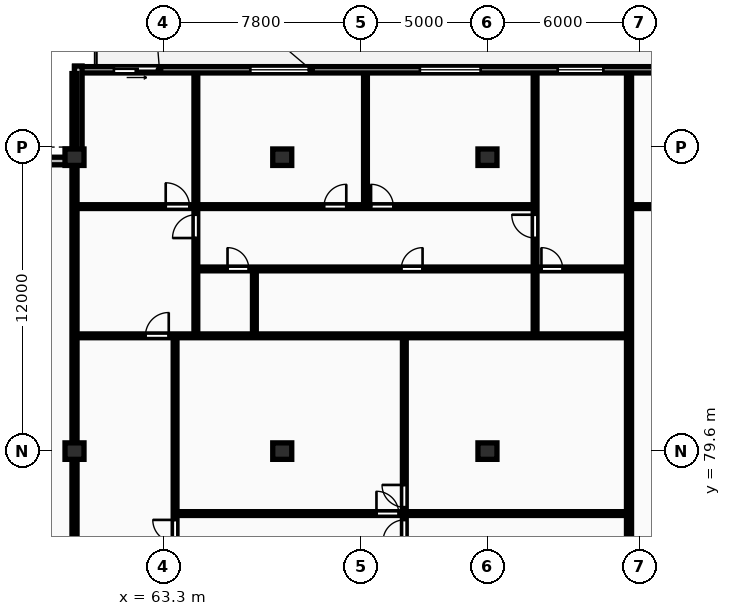
"""IFC4 building model, lengths in metres.
Left out: names, types, materials, properties, quantities, classifications, styles, units other than length and angle.
Written with IfcOpenShell. Run it as: python <this file> out.ifc"""

import sys

from ifc_helpers import new_model, si_unit, direction, frame, frame_2d, origin, origin_2d, place, context, subcontext, project, spatial, rectangle, extrude, element, fill, save


model = new_model("IFC4")
c1 = context("Model", 3, precision=1e-05, world=origin(), true_north=direction((0.0, 1.0)))
c2 = subcontext(c1, "Body", "Model", "MODEL_VIEW")
j1 = project(units=[si_unit("LENGTHUNIT", "METRE"), si_unit("PLANEANGLEUNIT", "RADIAN")], contexts=[c1])
p1 = place(None, origin())
s1 = spatial("IfcSite", under=j1, at=p1, CompositionType="ELEMENT")
p2 = place(p1, origin())
s2 = spatial("IfcBuilding", under=s1, at=p2, CompositionType="ELEMENT")
p3 = place(p2, frame((0.0, 0.0, 228.65)))
s3 = spatial("IfcBuildingStorey", under=s2, at=p3, CompositionType="ELEMENT", Elevation=228.65)
for number, where, z_axis, x_axis in (
    (1, (59.8, 79.6, 0.0), (0.0, 0.0, 1.0), (1.0, 0.0, 0.0)),
    (2, (59.8, 91.2, 0.0), (0.0, 0.0, 1.0), (1.0, 0.0, 0.0)),
    (3, (68.0, 79.6, 0.0), (0.0, 0.0, 1.0), (1.0, 0.0, 0.0)),
    (4, (68.0, 91.2, 0.0), (0.0, 0.0, 1.0), (1.0, 0.0, 0.0)),
    (5, (76.1, 79.6, 0.0), (0.0, 0.0, 1.0), (1.0, 0.0, 0.0)),
    (6, (76.1, 91.2, 0.0), (0.0, 0.0, 1.0), (1.0, 0.0, 0.0)),
):
    element("IfcColumn", number, at=place(p3, frame(where, z_axis=z_axis, x_axis=x_axis)), inside=s3, PredefinedType="COLUMN", context=c2, shape_type="SweptSolid", body=[
        extrude(rectangle(XDim=0.75, YDim=0.65, at=origin_2d()), origin(), (0.0, 0.0, 1.0), 3.45),
    ])
p4 = place(p3, frame((128.4, 94.65, 0.0), z_axis=(0.0, 0.0, 1.0), x_axis=(-1.0, 0.0, 0.0)))
e7 = element("IfcWall", 7, at=p4, inside=s3, PredefinedType="STANDARD", context=c2, shape_type="SweptSolid", body=[
    extrude(rectangle(XDim=68.6, YDim=0.25, at=frame_2d((34.3, 0.0))), origin(), (0.0, 0.0, 1.0), 3.17),
])
p5 = place(p4, frame((59.262, 0.0, 0.85)))
e8 = element("IfcOpeningElement", 8, at=p5, cuts=e7, PredefinedType="OPENING", context=c2, shape_type="SweptSolid", body=[
    extrude(rectangle(XDim=2.4, YDim=1.9, at=frame_2d((1.2, 0.95))), frame((0.0, 0.135, 0.0), z_axis=(0.0, -1.0, 0.0), x_axis=(1.0, 0.0, 0.0)), (0.0, 0.0, 1.0), 0.27),
])
p6 = place(p4, frame((52.567, 0.0, 0.85)))
e9 = element("IfcOpeningElement", 9, at=p6, cuts=e7, PredefinedType="OPENING", context=c2, shape_type="SweptSolid", body=[
    extrude(rectangle(XDim=2.4, YDim=1.9, at=frame_2d((1.2, 0.95))), frame((0.0, 0.135, 0.0), z_axis=(0.0, -1.0, 0.0), x_axis=(1.0, 0.0, 0.0)), (0.0, 0.0, 1.0), 0.27),
])
p7 = place(p4, frame((65.245, 0.0, 0.0)))
e10 = element("IfcOpeningElement", 10, at=p7, cuts=e7, PredefinedType="OPENING", context=c2, shape_type="SweptSolid", body=[
    extrude(rectangle(XDim=1.8, YDim=2.2, at=frame_2d((0.9, 1.1))), frame((0.0, 0.135, 0.0), z_axis=(0.0, -1.0, 0.0), x_axis=(1.0, 0.0, 0.0)), (0.0, 0.0, 1.0), 0.27),
])
p8 = place(p4, frame((47.726, 0.0, 0.85)))
e11 = element("IfcOpeningElement", 11, at=p8, cuts=e7, PredefinedType="OPENING", context=c2, shape_type="SweptSolid", body=[
    extrude(rectangle(XDim=1.8, YDim=1.8, at=frame_2d((0.9, 0.9))), frame((0.0, 0.135, 0.0), z_axis=(0.0, -1.0, 0.0), x_axis=(1.0, 0.0, 0.0)), (0.0, 0.0, 1.0), 0.27),
])
p9 = place(p4, frame((41.938, 0.0, 0.0)))
e12 = element("IfcOpeningElement", 12, at=p9, cuts=e7, PredefinedType="OPENING", context=c2, shape_type="SweptSolid", body=[
    extrude(rectangle(XDim=1.8, YDim=2.2, at=frame_2d((0.9, 1.1))), frame((0.0, 0.135, 0.0), z_axis=(0.0, -1.0, 0.0), x_axis=(1.0, 0.0, 0.0)), (0.0, 0.0, 1.0), 0.27),
])
p10 = place(p4, frame((32.824, 0.0, 0.85)))
e13 = element("IfcOpeningElement", 13, at=p10, cuts=e7, PredefinedType="OPENING", context=c2, shape_type="SweptSolid", body=[
    extrude(rectangle(XDim=2.4, YDim=1.9, at=frame_2d((1.2, 0.95))), frame((0.0, 0.135, 0.0), z_axis=(0.0, -1.0, 0.0), x_axis=(1.0, 0.0, 0.0)), (0.0, 0.0, 1.0), 0.27),
])
p11 = place(p4, frame((20.245, 0.0, 0.85)))
e14 = element("IfcOpeningElement", 14, at=p11, cuts=e7, PredefinedType="OPENING", context=c2, shape_type="SweptSolid", body=[
    extrude(rectangle(XDim=2.4, YDim=1.9, at=frame_2d((1.2, 0.95))), frame((0.0, 0.135, 0.0), z_axis=(0.0, -1.0, 0.0), x_axis=(1.0, 0.0, 0.0)), (0.0, 0.0, 1.0), 0.27),
])
p12 = place(p4, frame((15.645, 0.0, 0.85)))
e15 = element("IfcOpeningElement", 15, at=p12, cuts=e7, PredefinedType="OPENING", context=c2, shape_type="SweptSolid", body=[
    extrude(rectangle(XDim=2.4, YDim=1.9, at=frame_2d((1.2, 0.95))), frame((0.0, 0.135, 0.0), z_axis=(0.0, -1.0, 0.0), x_axis=(1.0, 0.0, 0.0)), (0.0, 0.0, 1.0), 0.27),
])
p13 = place(p4, frame((25.272, 0.0, 0.0)))
e16 = element("IfcOpeningElement", 16, at=p13, cuts=e7, PredefinedType="OPENING", context=c2, shape_type="SweptSolid", body=[
    extrude(rectangle(XDim=1.8, YDim=2.2, at=frame_2d((0.9, 1.1))), frame((0.0, 0.135, 0.0), z_axis=(0.0, -1.0, 0.0), x_axis=(1.0, 0.0, 0.0)), (0.0, 0.0, 1.0), 0.27),
])
p14 = place(p4, frame((12.11, 0.0, 0.85)))
e17 = element("IfcOpeningElement", 17, at=p14, cuts=e7, PredefinedType="OPENING", context=c2, shape_type="SweptSolid", body=[
    extrude(rectangle(XDim=1.8, YDim=1.8, at=frame_2d((0.9, 0.9))), frame((0.0, 0.135, 0.0), z_axis=(0.0, -1.0, 0.0), x_axis=(1.0, 0.0, 0.0)), (0.0, 0.0, 1.0), 0.27),
])
p15 = place(p4, frame((6.515, 0.0, 0.0)))
e18 = element("IfcOpeningElement", 18, at=p15, cuts=e7, PredefinedType="OPENING", context=c2, shape_type="SweptSolid", body=[
    extrude(rectangle(XDim=1.8, YDim=2.2, at=frame_2d((0.9, 1.1))), frame((0.0, 0.135, 0.0), z_axis=(0.0, -1.0, 0.0), x_axis=(1.0, 0.0, 0.0)), (0.0, 0.0, 1.0), 0.27),
])
p16 = place(p4, frame((0.87, 0.0, 0.85)))
e19 = element("IfcOpeningElement", 19, at=p16, cuts=e7, PredefinedType="OPENING", context=c2, shape_type="SweptSolid", body=[
    extrude(rectangle(XDim=1.8, YDim=1.8, at=frame_2d((0.9, 0.9))), frame((0.0, 0.135, 0.0), z_axis=(0.0, -1.0, 0.0), x_axis=(1.0, 0.0, 0.0)), (0.0, 0.0, 1.0), 0.27),
])
for number, where, z_axis, x_axis in (
    (20, (59.95, 94.8, 0.0), (0.0, 0.0, 1.0), (0.0, -1.0, 0.0)),
    (21, (59.8, 91.05, 0.0), (0.0, 0.0, 1.0), (-1.0, 0.0, 0.0)),
):
    element("IfcWall", number, at=place(p3, frame(where, z_axis=z_axis, x_axis=x_axis)), inside=s3, PredefinedType="STANDARD", context=c2, shape_type="SweptSolid", body=[
        extrude(rectangle(XDim=3.6, YDim=0.3, at=frame_2d((1.8, 0.0))), origin(), (0.0, 0.0, 1.0), 3.17),
    ])
p17 = place(p3, frame((59.8, 70.18, 0.0), z_axis=(0.0, 0.0, 1.0), x_axis=(0.0, 1.0, 0.0)))
e22 = element("IfcWall", 22, at=p17, inside=s3, PredefinedType="PARTITIONING", context=c2, shape_type="SweptSolid", body=[
    extrude(rectangle(XDim=24.32, YDim=0.2, at=frame_2d((12.16, 0.0))), origin(), (0.0, 0.0, 1.0), 2.477),
])
p18 = place(p3, frame((81.687, 70.18, 0.0), z_axis=(0.0, 0.0, 1.0), x_axis=(0.0, 1.0, 0.0)))
e23 = element("IfcWall", 23, at=p18, inside=s3, PredefinedType="PARTITIONING", context=c2, shape_type="SweptSolid", body=[
    extrude(rectangle(XDim=24.32, YDim=0.2, at=frame_2d((12.16, 0.0))), origin(), (0.0, 0.0, 1.0), 3.17),
])
p19 = place(p3, frame((72.819, 70.16, 0.0), z_axis=(0.0, 0.0, 1.0), x_axis=(0.0, 1.0, 0.0)))
e24 = element("IfcWall", 24, at=p19, inside=s3, PredefinedType="PARTITIONING", context=c2, shape_type="SweptSolid", body=[
    extrude(rectangle(XDim=13.95, YDim=0.15, at=frame_2d((6.975, 0.0))), origin(), (0.0, 0.0, 1.0), 3.17),
])
p20 = place(p19, frame((5.885, 0.0, 0.0)))
e25 = element("IfcOpeningElement", 25, at=p20, cuts=e24, PredefinedType="OPENING", context=c2, shape_type="SweptSolid", body=[
    extrude(rectangle(XDim=0.84, YDim=2.04, at=frame_2d((0.42, 1.02))), frame((0.0, 0.085, 0.0), z_axis=(0.0, -1.0, 0.0), x_axis=(1.0, 0.0, 0.0)), (0.0, 0.0, 1.0), 0.17),
])
p21 = place(p19, frame((7.225, 0.0, 0.0)))
e26 = element("IfcOpeningElement", 26, at=p21, cuts=e24, PredefinedType="OPENING", context=c2, shape_type="SweptSolid", body=[
    extrude(rectangle(XDim=0.88, YDim=2.06, at=frame_2d((0.44, 1.03))), frame((0.0, 0.085, 0.0), z_axis=(0.0, -1.0, 0.0), x_axis=(1.0, 0.0, 0.0)), (0.0, 0.0, 1.0), 0.17),
])
p22 = place(p3, frame((63.83, 77.135, 0.0), z_axis=(0.0, 0.0, 1.0), x_axis=(1.0, 0.0, 0.0)))
e27 = element("IfcWall", 27, at=p22, inside=s3, PredefinedType="PARTITIONING", context=c2, shape_type="SweptSolid", body=[
    extrude(rectangle(XDim=17.777, YDim=0.15, at=frame_2d((8.889, 0.0))), origin(), (0.0, 0.0, 1.0), 3.17),
])
p23 = place(p22, frame((7.889, 0.0, 0.0)))
e28 = element("IfcOpeningElement", 28, at=p23, cuts=e27, PredefinedType="OPENING", context=c2, shape_type="SweptSolid", body=[
    extrude(rectangle(XDim=0.88, YDim=2.06, at=frame_2d((0.44, 1.03))), frame((0.0, 0.085, 0.0), z_axis=(0.0, -1.0, 0.0), x_axis=(1.0, 0.0, 0.0)), (0.0, 0.0, 1.0), 0.17),
])
p24 = place(p3, frame((63.77, 70.16, 0.0), z_axis=(0.0, 0.0, 1.0), x_axis=(0.0, 1.0, 0.0)))
e29 = element("IfcWall", 29, at=p24, inside=s3, PredefinedType="PARTITIONING", context=c2, shape_type="SweptSolid", body=[
    extrude(rectangle(XDim=13.95, YDim=0.15, at=frame_2d((6.975, 0.0))), origin(), (0.0, 0.0, 1.0), 3.17),
])
p25 = place(p24, frame((5.845, 0.0, 0.0)))
e30 = element("IfcOpeningElement", 30, at=p25, cuts=e29, PredefinedType="OPENING", context=c2, shape_type="SweptSolid", body=[
    extrude(rectangle(XDim=0.88, YDim=2.06, at=frame_2d((0.44, 1.03))), frame((0.0, 0.085, 0.0), z_axis=(0.0, -1.0, 0.0), x_axis=(1.0, 0.0, 0.0)), (0.0, 0.0, 1.0), 0.17),
])
p26 = place(p3, frame((66.9, 84.19, 0.0), z_axis=(0.0, 0.0, 1.0), x_axis=(0.0, 1.0, 0.0)))
e31 = element("IfcWall", 31, at=p26, inside=s3, PredefinedType="PARTITIONING", context=c2, shape_type="SweptSolid", body=[
    extrude(rectangle(XDim=2.58, YDim=0.15, at=frame_2d((1.29, 0.0))), origin(), (0.0, 0.0, 1.0), 3.17),
])
p27 = place(p3, frame((71.285, 89.33, 0.0), z_axis=(0.0, 0.0, 1.0), x_axis=(0.0, 1.0, 0.0)))
e32 = element("IfcWall", 32, at=p27, inside=s3, PredefinedType="PARTITIONING", context=c2, shape_type="SweptSolid", body=[
    extrude(rectangle(XDim=5.17, YDim=0.15, at=frame_2d((2.585, 0.0))), origin(), (0.0, 0.0, 1.0), 3.17),
])
p28 = place(p3, frame((64.59, 84.19, 0.0), z_axis=(0.0, 0.0, 1.0), x_axis=(0.0, 1.0, 0.0)))
e33 = element("IfcWall", 33, at=p28, inside=s3, PredefinedType="PARTITIONING", context=c2, shape_type="SweptSolid", body=[
    extrude(rectangle(XDim=10.31, YDim=0.15, at=frame_2d((5.155, 0.0))), origin(), (0.0, 0.0, 1.0), 3.17),
])
p29 = place(p28, frame((3.82, 0.0, 0.0)))
e34 = element("IfcOpeningElement", 34, at=p29, cuts=e33, PredefinedType="OPENING", context=c2, shape_type="SweptSolid", body=[
    extrude(rectangle(XDim=0.92, YDim=2.08, at=frame_2d((0.46, 1.04))), frame((0.0, 0.085, 0.0), z_axis=(0.0, -1.0, 0.0), x_axis=(1.0, 0.0, 0.0)), (0.0, 0.0, 1.0), 0.17),
])
p30 = place(p3, frame((77.98, 84.19, 0.0), z_axis=(0.0, 0.0, 1.0), x_axis=(0.0, 1.0, 0.0)))
e35 = element("IfcWall", 35, at=p30, inside=s3, PredefinedType="PARTITIONING", context=c2, shape_type="SweptSolid", body=[
    extrude(rectangle(XDim=2.58, YDim=0.15, at=frame_2d((1.29, 0.0))), origin(), (0.0, 0.0, 1.0), 3.17),
])
p31 = place(p3, frame((77.98, 86.81, 0.0), z_axis=(0.0, 0.0, 1.0), x_axis=(0.0, 1.0, 0.0)))
e36 = element("IfcWall", 36, at=p31, inside=s3, PredefinedType="PARTITIONING", context=c2, shape_type="SweptSolid", body=[
    extrude(rectangle(XDim=7.69, YDim=0.15, at=frame_2d((3.845, 0.0))), origin(), (0.0, 0.0, 1.0), 3.17),
])
p32 = place(p31, frame((1.2, 0.0, 0.0)))
e37 = element("IfcOpeningElement", 37, at=p32, cuts=e36, PredefinedType="OPENING", context=c2, shape_type="SweptSolid", body=[
    extrude(rectangle(XDim=0.92, YDim=2.08, at=frame_2d((0.46, 1.04))), frame((0.0, 0.085, 0.0), z_axis=(0.0, -1.0, 0.0), x_axis=(1.0, 0.0, 0.0)), (0.0, 0.0, 1.0), 0.17),
])
p33 = place(p3, frame((64.63, 86.79, 0.0), z_axis=(0.0, 0.0, 1.0), x_axis=(1.0, 0.0, 0.0)))
e38 = element("IfcWall", 38, at=p33, inside=s3, PredefinedType="PARTITIONING", context=c2, shape_type="SweptSolid", body=[
    extrude(rectangle(XDim=16.978, YDim=0.15, at=frame_2d((8.489, 0.0))), origin(), (0.0, 0.0, 1.0), 3.17),
])
p34 = place(p33, frame((1.21, 0.0, 0.0)))
e39 = element("IfcOpeningElement", 39, at=p34, cuts=e38, PredefinedType="OPENING", context=c2, shape_type="SweptSolid", body=[
    extrude(rectangle(XDim=0.84, YDim=2.04, at=frame_2d((0.42, 1.02))), frame((0.0, 0.085, 0.0), z_axis=(0.0, -1.0, 0.0), x_axis=(1.0, 0.0, 0.0)), (0.0, 0.0, 1.0), 0.17),
])
p35 = place(p33, frame((8.069, 0.0, 0.0)))
e40 = element("IfcOpeningElement", 40, at=p35, cuts=e38, PredefinedType="OPENING", context=c2, shape_type="SweptSolid", body=[
    extrude(rectangle(XDim=0.84, YDim=2.04, at=frame_2d((0.42, 1.02))), frame((0.0, 0.085, 0.0), z_axis=(0.0, -1.0, 0.0), x_axis=(1.0, 0.0, 0.0)), (0.0, 0.0, 1.0), 0.17),
])
p36 = place(p33, frame((13.6, 0.0, 0.0)))
e41 = element("IfcOpeningElement", 41, at=p36, cuts=e38, PredefinedType="OPENING", context=c2, shape_type="SweptSolid", body=[
    extrude(rectangle(XDim=0.84, YDim=2.04, at=frame_2d((0.42, 1.02))), frame((0.0, 0.085, 0.0), z_axis=(0.0, -1.0, 0.0), x_axis=(1.0, 0.0, 0.0)), (0.0, 0.0, 1.0), 0.17),
])
p37 = place(p3, frame((59.88, 84.15, 0.0), z_axis=(0.0, 0.0, 1.0), x_axis=(1.0, 0.0, 0.0)))
e42 = element("IfcWall", 42, at=p37, inside=s3, PredefinedType="PARTITIONING", context=c2, shape_type="SweptSolid", body=[
    extrude(rectangle(XDim=21.728, YDim=0.15, at=frame_2d((10.864, 0.0))), origin(), (0.0, 0.0, 1.0), 3.17),
])
p38 = place(p37, frame((2.72, 0.0, 0.0)))
e43 = element("IfcOpeningElement", 43, at=p38, cuts=e42, PredefinedType="OPENING", context=c2, shape_type="SweptSolid", body=[
    extrude(rectangle(XDim=0.92, YDim=2.08, at=frame_2d((0.46, 1.04))), frame((0.0, 0.085, 0.0), z_axis=(0.0, -1.0, 0.0), x_axis=(1.0, 0.0, 0.0)), (0.0, 0.0, 1.0), 0.17),
])
p39 = place(p3, frame((59.88, 89.25, 0.0), z_axis=(0.0, 0.0, 1.0), x_axis=(1.0, 0.0, 0.0)))
e44 = element("IfcWall", 44, at=p39, inside=s3, PredefinedType="PARTITIONING", context=c2, shape_type="SweptSolid", body=[
    extrude(rectangle(XDim=18.1, YDim=0.15, at=frame_2d((9.05, 0.0))), origin(), (0.0, 0.0, 1.0), 3.17),
])
p40 = place(p39, frame((3.52, 0.0, 0.0)))
e45 = element("IfcOpeningElement", 45, at=p40, cuts=e44, PredefinedType="OPENING", context=c2, shape_type="SweptSolid", body=[
    extrude(rectangle(XDim=0.94, YDim=2.1, at=frame_2d((0.47, 1.05))), frame((0.0, 0.085, 0.0), z_axis=(0.0, -1.0, 0.0), x_axis=(1.0, 0.0, 0.0)), (0.0, 0.0, 1.0), 0.17),
])
p41 = place(p39, frame((9.768, 0.0, 0.0)))
e46 = element("IfcOpeningElement", 46, at=p41, cuts=e44, PredefinedType="OPENING", context=c2, shape_type="SweptSolid", body=[
    extrude(rectangle(XDim=0.88, YDim=2.06, at=frame_2d((0.44, 1.03))), frame((0.0, 0.085, 0.0), z_axis=(0.0, -1.0, 0.0), x_axis=(1.0, 0.0, 0.0)), (0.0, 0.0, 1.0), 0.17),
])
p42 = place(p39, frame((11.625, 0.0, 0.0)))
e47 = element("IfcOpeningElement", 47, at=p42, cuts=e44, PredefinedType="OPENING", context=c2, shape_type="SweptSolid", body=[
    extrude(rectangle(XDim=0.88, YDim=2.06, at=frame_2d((0.44, 1.03))), frame((0.0, 0.085, 0.0), z_axis=(0.0, -1.0, 0.0), x_axis=(1.0, 0.0, 0.0)), (0.0, 0.0, 1.0), 0.17),
])
p43 = place(p3, frame((81.767, 89.25, 0.0), z_axis=(0.0, 0.0, 1.0), x_axis=(1.0, 0.0, 0.0)))
e48 = element("IfcWall", 48, at=p43, inside=s3, PredefinedType="PARTITIONING", context=c2, shape_type="SweptSolid", body=[
    extrude(rectangle(XDim=17.708, YDim=0.15, at=frame_2d((8.854, 0.0))), origin(), (0.0, 0.0, 1.0), 3.17),
])
p44 = place(p43, frame((6.359, 0.0, 0.0)))
e49 = element("IfcOpeningElement", 49, at=p44, cuts=e48, PredefinedType="OPENING", context=c2, shape_type="SweptSolid", body=[
    extrude(rectangle(XDim=0.94, YDim=2.1, at=frame_2d((0.47, 1.05))), frame((0.0, 0.085, 0.0), z_axis=(0.0, -1.0, 0.0), x_axis=(1.0, 0.0, 0.0)), (0.0, 0.0, 1.0), 0.17),
])
p45 = place(p43, frame((8.384, 0.0, 0.0)))
e50 = element("IfcOpeningElement", 50, at=p45, cuts=e48, PredefinedType="OPENING", context=c2, shape_type="SweptSolid", body=[
    extrude(rectangle(XDim=0.94, YDim=2.1, at=frame_2d((0.47, 1.05))), frame((0.0, 0.085, 0.0), z_axis=(0.0, -1.0, 0.0), x_axis=(1.0, 0.0, 0.0)), (0.0, 0.0, 1.0), 0.17),
])
p46 = place(p5, origin())
e51 = element("IfcWindow", 51, at=p46, inside=s3, PartitioningType="DOUBLE_PANEL_VERTICAL", PredefinedType="WINDOW", context=c2, shape_type="SweptSolid", body=[
    extrude(rectangle(XDim=2.4, YDim=1.9, at=frame_2d((1.2, 0.95))), frame((0.0, 0.03, 0.0), z_axis=(0.0, -1.0, 0.0), x_axis=(1.0, 0.0, 0.0)), (0.0, 0.0, 1.0), 0.06),
])
fill(e8, e51)
p47 = place(p6, origin())
e52 = element("IfcWindow", 52, at=p47, inside=s3, PartitioningType="DOUBLE_PANEL_VERTICAL", PredefinedType="WINDOW", context=c2, shape_type="SweptSolid", body=[
    extrude(rectangle(XDim=2.4, YDim=1.9, at=frame_2d((1.2, 0.95))), frame((0.0, 0.03, 0.0), z_axis=(0.0, -1.0, 0.0), x_axis=(1.0, 0.0, 0.0)), (0.0, 0.0, 1.0), 0.06),
])
fill(e9, e52)
p48 = place(p7, origin())
e53 = element("IfcDoor", 53, at=p48, inside=s3, OperationType="SLIDING_TO_LEFT", PredefinedType="DOOR", context=c2, shape_type="SweptSolid", body=[
    extrude(rectangle(XDim=1.8, YDim=2.2, at=frame_2d((0.9, 1.1))), frame((0.0, 0.025, 0.0), z_axis=(0.0, -1.0, 0.0), x_axis=(1.0, 0.0, 0.0)), (0.0, 0.0, 1.0), 0.05),
])
fill(e10, e53)
p49 = place(p8, origin())
e54 = element("IfcWindow", 54, at=p49, inside=s3, PartitioningType="SINGLE_PANEL", PredefinedType="WINDOW", context=c2, shape_type="SweptSolid", body=[
    extrude(rectangle(XDim=1.8, YDim=1.8, at=frame_2d((0.9, 0.9))), frame((0.0, 0.03, 0.0), z_axis=(0.0, -1.0, 0.0), x_axis=(1.0, 0.0, 0.0)), (0.0, 0.0, 1.0), 0.06),
])
fill(e11, e54)
p50 = place(p20, origin())
e55 = element("IfcDoor", 55, at=p50, inside=s3, OperationType="SINGLE_SWING_LEFT", PredefinedType="DOOR", context=c2, shape_type="SweptSolid", body=[
    extrude(rectangle(XDim=0.84, YDim=2.04, at=frame_2d((0.42, 1.02))), frame((0.0, 0.025, 0.0), z_axis=(0.0, -1.0, 0.0), x_axis=(1.0, 0.0, 0.0)), (0.0, 0.0, 1.0), 0.05),
])
fill(e25, e55)
p51 = place(p21, origin())
e56 = element("IfcDoor", 56, at=p51, inside=s3, OperationType="SINGLE_SWING_RIGHT", PredefinedType="DOOR", context=c2, shape_type="SweptSolid", body=[
    extrude(rectangle(XDim=0.88, YDim=2.06, at=frame_2d((0.44, 1.03))), frame((0.0, 0.025, 0.0), z_axis=(0.0, -1.0, 0.0), x_axis=(1.0, 0.0, 0.0)), (0.0, 0.0, 1.0), 0.05),
])
fill(e26, e56)
p52 = place(p23, origin())
e57 = element("IfcDoor", 57, at=p52, inside=s3, OperationType="SINGLE_SWING_LEFT", PredefinedType="DOOR", context=c2, shape_type="SweptSolid", body=[
    extrude(rectangle(XDim=0.88, YDim=2.06, at=frame_2d((0.44, 1.03))), frame((0.0, 0.025, 0.0), z_axis=(0.0, -1.0, 0.0), x_axis=(1.0, 0.0, 0.0)), (0.0, 0.0, 1.0), 0.05),
])
fill(e28, e57)
p53 = place(p25, origin())
e58 = element("IfcDoor", 58, at=p53, inside=s3, OperationType="SINGLE_SWING_RIGHT", PredefinedType="DOOR", context=c2, shape_type="SweptSolid", body=[
    extrude(rectangle(XDim=0.88, YDim=2.06, at=frame_2d((0.44, 1.03))), frame((0.0, 0.025, 0.0), z_axis=(0.0, -1.0, 0.0), x_axis=(1.0, 0.0, 0.0)), (0.0, 0.0, 1.0), 0.05),
])
fill(e30, e58)
p54 = place(p29, origin())
e59 = element("IfcDoor", 59, at=p54, inside=s3, OperationType="SINGLE_SWING_LEFT", PredefinedType="DOOR", context=c2, shape_type="SweptSolid", body=[
    extrude(rectangle(XDim=0.92, YDim=2.08, at=frame_2d((0.46, 1.04))), frame((0.0, 0.025, 0.0), z_axis=(0.0, -1.0, 0.0), x_axis=(1.0, 0.0, 0.0)), (0.0, 0.0, 1.0), 0.05),
])
fill(e34, e59)
p55 = place(p32, origin())
e60 = element("IfcDoor", 60, at=p55, inside=s3, OperationType="SINGLE_SWING_RIGHT", PredefinedType="DOOR", context=c2, shape_type="SweptSolid", body=[
    extrude(rectangle(XDim=0.92, YDim=2.08, at=frame_2d((0.46, 1.04))), frame((0.0, 0.025, 0.0), z_axis=(0.0, -1.0, 0.0), x_axis=(1.0, 0.0, 0.0)), (0.0, 0.0, 1.0), 0.05),
])
fill(e37, e60)
p56 = place(p34, origin())
e61 = element("IfcDoor", 61, at=p56, inside=s3, OperationType="SINGLE_SWING_LEFT", PredefinedType="DOOR", context=c2, shape_type="SweptSolid", body=[
    extrude(rectangle(XDim=0.84, YDim=2.04, at=frame_2d((0.42, 1.02))), frame((0.0, 0.025, 0.0), z_axis=(0.0, -1.0, 0.0), x_axis=(1.0, 0.0, 0.0)), (0.0, 0.0, 1.0), 0.05),
])
fill(e39, e61)
p57 = place(p35, origin())
e62 = element("IfcDoor", 62, at=p57, inside=s3, OperationType="SINGLE_SWING_RIGHT", PredefinedType="DOOR", context=c2, shape_type="SweptSolid", body=[
    extrude(rectangle(XDim=0.84, YDim=2.04, at=frame_2d((0.42, 1.02))), frame((0.0, 0.025, 0.0), z_axis=(0.0, -1.0, 0.0), x_axis=(1.0, 0.0, 0.0)), (0.0, 0.0, 1.0), 0.05),
])
fill(e40, e62)
p58 = place(p36, origin())
e63 = element("IfcDoor", 63, at=p58, inside=s3, OperationType="SINGLE_SWING_LEFT", PredefinedType="DOOR", context=c2, shape_type="SweptSolid", body=[
    extrude(rectangle(XDim=0.84, YDim=2.04, at=frame_2d((0.42, 1.02))), frame((0.0, 0.025, 0.0), z_axis=(0.0, -1.0, 0.0), x_axis=(1.0, 0.0, 0.0)), (0.0, 0.0, 1.0), 0.05),
])
fill(e41, e63)
p59 = place(p38, origin())
e64 = element("IfcDoor", 64, at=p59, inside=s3, OperationType="SINGLE_SWING_RIGHT", PredefinedType="DOOR", context=c2, shape_type="SweptSolid", body=[
    extrude(rectangle(XDim=0.92, YDim=2.08, at=frame_2d((0.46, 1.04))), frame((0.0, 0.025, 0.0), z_axis=(0.0, -1.0, 0.0), x_axis=(1.0, 0.0, 0.0)), (0.0, 0.0, 1.0), 0.05),
])
fill(e43, e64)
p60 = place(p40, origin())
e65 = element("IfcDoor", 65, at=p60, inside=s3, OperationType="SINGLE_SWING_LEFT", PredefinedType="DOOR", context=c2, shape_type="SweptSolid", body=[
    extrude(rectangle(XDim=0.94, YDim=2.1, at=frame_2d((0.47, 1.05))), frame((0.0, 0.025, 0.0), z_axis=(0.0, -1.0, 0.0), x_axis=(1.0, 0.0, 0.0)), (0.0, 0.0, 1.0), 0.05),
])
fill(e45, e65)
p61 = place(p41, origin())
e66 = element("IfcDoor", 66, at=p61, inside=s3, OperationType="SINGLE_SWING_RIGHT", PredefinedType="DOOR", context=c2, shape_type="SweptSolid", body=[
    extrude(rectangle(XDim=0.88, YDim=2.06, at=frame_2d((0.44, 1.03))), frame((0.0, 0.025, 0.0), z_axis=(0.0, -1.0, 0.0), x_axis=(1.0, 0.0, 0.0)), (0.0, 0.0, 1.0), 0.05),
])
fill(e46, e66)
p62 = place(p42, origin())
e67 = element("IfcDoor", 67, at=p62, inside=s3, OperationType="SINGLE_SWING_LEFT", PredefinedType="DOOR", context=c2, shape_type="SweptSolid", body=[
    extrude(rectangle(XDim=0.88, YDim=2.06, at=frame_2d((0.44, 1.03))), frame((0.0, 0.025, 0.0), z_axis=(0.0, -1.0, 0.0), x_axis=(1.0, 0.0, 0.0)), (0.0, 0.0, 1.0), 0.05),
])
fill(e47, e67)
save(model, sys.argv[1])
